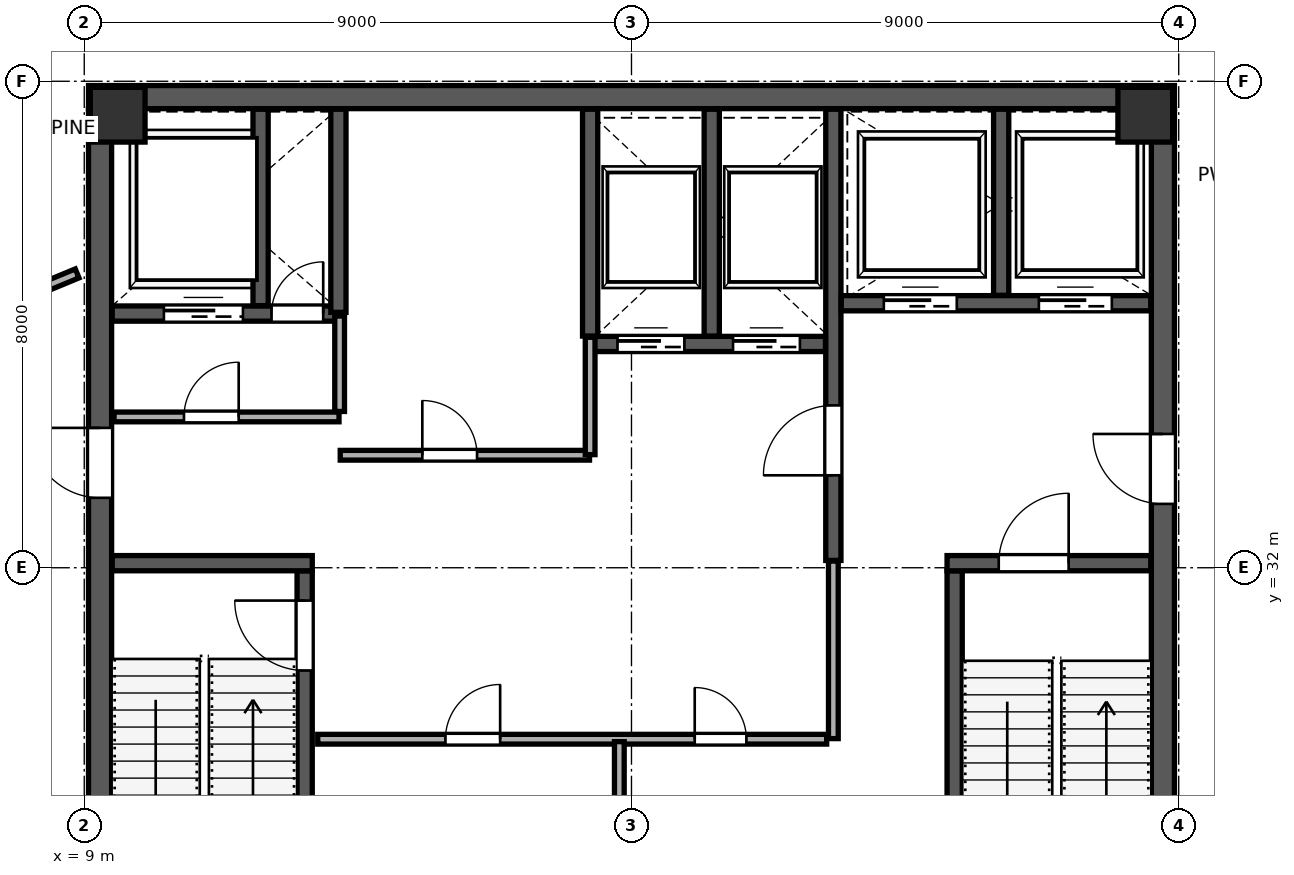
"""IFC4 building model, lengths in metres.
Left out: names, types, materials, properties, quantities, classifications, styles, units other than length and angle.
Written with IfcOpenShell. Run it as: python <this file> out.ifc"""

import sys

from ifc_helpers import new_model, si_unit, direction, frame, frame_2d, origin, origin_2d, place, context, subcontext, project, spatial, rectangle, extrude, source, transform, mapped, element, fill, save


model = new_model("IFC4")
c1 = context("Model", 3, precision=1e-05, world=origin(), true_north=direction((0.0, 1.0)))
c2 = subcontext(c1, "Body", "Model", "MODEL_VIEW")
j1 = project(units=[si_unit("LENGTHUNIT", "METRE"), si_unit("PLANEANGLEUNIT", "RADIAN")], contexts=[c1])
p1 = place(None, origin())
s1 = spatial("IfcSite", under=j1, at=p1, CompositionType="ELEMENT")
p2 = place(p1, origin())
s2 = spatial("IfcBuilding", under=s1, at=p2, CompositionType="ELEMENT")
p3 = place(p2, frame((0.0, 0.0, 360.0)))
s3 = spatial("IfcBuildingStorey", under=s2, at=p3, CompositionType="ELEMENT", Elevation=360.0)
m1 = source(origin(), c2, "Body", "SweptSolid", [
    extrude(rectangle(XDim=0.9, YDim=0.9, at=origin_2d()), origin(), (0.0, 0.0, 1.0), 5.999),
])
for number, where, z_axis, x_axis in (
    (1, (9.55, 39.45, 0.001), (0.0, 0.0, 1.0), (1.0, 0.0, 0.0)),
    (2, (26.45, 39.45, 0.001), (0.0, 0.0, 1.0), (1.0, 0.0, 0.0)),
):
    element("IfcColumn", number, at=place(p3, frame(where, z_axis=z_axis, x_axis=x_axis)), inside=s3, PredefinedType="COLUMN", context=c2, shape_type="MappedRepresentation", body=[
        mapped(m1, transform((0.0, 0.0, 0.0), scale=1.0)),
    ])
p4 = place(p3, frame((9.26, 24.45, 0.0), z_axis=(0.0, 0.0, 1.0), x_axis=(0.0, 1.0, 0.0)))
e3 = element("IfcWall", 3, at=p4, inside=s3, PredefinedType="SHEAR", context=c2, shape_type="SweptSolid", body=[
    extrude(rectangle(XDim=15.1, YDim=0.38, at=frame_2d((7.55, 0.0))), origin(), (0.0, 0.0, 1.0), 5.72),
])
p5 = place(p4, frame((8.7, 0.0, 0.0)))
e4 = element("IfcOpeningElement", 4, at=p5, cuts=e3, PredefinedType="OPENING", context=c2, shape_type="SweptSolid", body=[
    extrude(rectangle(XDim=1.15, YDim=2.2, at=frame_2d((0.575, 1.1))), frame((0.0, 0.2, 0.0), z_axis=(0.0, -1.0, 0.0), x_axis=(1.0, 0.0, 0.0)), (0.0, 0.0, 1.0), 0.4),
])
p6 = place(p3, frame((26.74, 24.45, 0.0), z_axis=(0.0, 0.0, 1.0), x_axis=(0.0, 1.0, 0.0)))
e5 = element("IfcWall", 5, at=p6, inside=s3, PredefinedType="SHEAR", context=c2, shape_type="SweptSolid", body=[
    extrude(rectangle(XDim=15.1, YDim=0.38, at=frame_2d((7.55, 0.0))), origin(), (0.0, 0.0, 1.0), 5.72),
])
p7 = place(p6, frame((8.6, 0.0, 0.0)))
e6 = element("IfcOpeningElement", 6, at=p7, cuts=e5, PredefinedType="OPENING", context=c2, shape_type="SweptSolid", body=[
    extrude(rectangle(XDim=1.15, YDim=2.2, at=frame_2d((0.575, 1.1))), frame((0.0, 0.2, 0.0), z_axis=(0.0, -1.0, 0.0), x_axis=(1.0, 0.0, 0.0)), (0.0, 0.0, 1.0), 0.4),
])
p8 = place(p3, frame((9.07, 39.74, 0.0), z_axis=(0.0, 0.0, 1.0), x_axis=(1.0, 0.0, 0.0)))
e7 = element("IfcWall", 7, at=p8, inside=s3, PredefinedType="SHEAR", context=c2, shape_type="SweptSolid", body=[
    extrude(rectangle(XDim=17.86, YDim=0.38, at=frame_2d((8.93, 0.0))), origin(), (0.0, 0.0, 1.0), 5.72),
])
p9 = place(p3, frame((12.625, 24.46, 0.0), z_axis=(0.0, 0.0, 1.0), x_axis=(0.0, 1.0, 0.0)))
e8 = element("IfcWall", 8, at=p9, inside=s3, PredefinedType="SHEAR", context=c2, shape_type="SweptSolid", body=[
    extrude(rectangle(XDim=7.49, YDim=0.25, at=frame_2d((3.745, 0.0))), origin(), (0.0, 0.0, 1.0), 5.72),
])
p10 = place(p9, frame((5.85, 0.0, 0.0)))
e9 = element("IfcOpeningElement", 9, at=p10, cuts=e8, PredefinedType="OPENING", context=c2, shape_type="SweptSolid", body=[
    extrude(rectangle(XDim=1.15, YDim=2.2, at=frame_2d((0.575, 1.1))), frame((0.0, 0.135, 0.0), z_axis=(0.0, -1.0, 0.0), x_axis=(1.0, 0.0, 0.0)), (0.0, 0.0, 1.0), 0.27),
])
p11 = place(p3, frame((9.46, 32.075, 0.0), z_axis=(0.0, 0.0, 1.0), x_axis=(1.0, 0.0, 0.0)))
e10 = element("IfcWall", 10, at=p11, inside=s3, PredefinedType="SHEAR", context=c2, shape_type="SweptSolid", body=[
    extrude(rectangle(XDim=3.29, YDim=0.25, at=frame_2d((1.645, 0.0))), origin(), (0.0, 0.0, 1.0), 5.72),
])
p12 = place(p3, frame((23.315, 24.46, 0.0), z_axis=(0.0, 0.0, 1.0), x_axis=(0.0, 1.0, 0.0)))
e11 = element("IfcWall", 11, at=p12, inside=s3, PredefinedType="SHEAR", context=c2, shape_type="SweptSolid", body=[
    extrude(rectangle(XDim=7.49, YDim=0.25, at=frame_2d((3.745, 0.0))), origin(), (0.0, 0.0, 1.0), 5.72),
])
p13 = place(p3, frame((23.19, 32.075, 0.0), z_axis=(0.0, 0.0, 1.0), x_axis=(1.0, 0.0, 0.0)))
e12 = element("IfcWall", 12, at=p13, inside=s3, PredefinedType="SHEAR", context=c2, shape_type="SweptSolid", body=[
    extrude(rectangle(XDim=3.35, YDim=0.25, at=frame_2d((1.675, 0.0))), origin(), (0.0, 0.0, 1.0), 5.72),
])
p14 = place(p13, frame((0.85, 0.0, 0.0)))
e13 = element("IfcOpeningElement", 13, at=p14, cuts=e12, PredefinedType="OPENING", context=c2, shape_type="SweptSolid", body=[
    extrude(rectangle(XDim=1.15, YDim=2.2, at=frame_2d((0.575, 1.1))), frame((0.0, 0.135, 0.0), z_axis=(0.0, -1.0, 0.0), x_axis=(1.0, 0.0, 0.0)), (0.0, 0.0, 1.0), 0.27),
])
p15 = place(p3, frame((21.32, 32.12, 0.0), z_axis=(0.0, 0.0, 1.0), x_axis=(0.0, 1.0, 0.0)))
e14 = element("IfcWall", 14, at=p15, inside=s3, PredefinedType="SHEAR", context=c2, shape_type="SweptSolid", body=[
    extrude(rectangle(XDim=7.42, YDim=0.25, at=frame_2d((3.71, 0.0))), origin(), (0.0, 0.0, 1.0), 5.72),
])
p16 = place(p15, frame((1.4, 0.0, 0.0)))
e15 = element("IfcOpeningElement", 15, at=p16, cuts=e14, PredefinedType="OPENING", context=c2, shape_type="SweptSolid", body=[
    extrude(rectangle(XDim=1.15, YDim=2.2, at=frame_2d((0.575, 1.1))), frame((0.0, 0.135, 0.0), z_axis=(0.0, -1.0, 0.0), x_axis=(1.0, 0.0, 0.0)), (0.0, 0.0, 1.0), 0.27),
])
p17 = place(p3, frame((9.46, 36.18, 0.0), z_axis=(0.0, 0.0, 1.0), x_axis=(1.0, 0.0, 0.0)))
e16 = element("IfcWall", 16, at=p17, inside=s3, PredefinedType="SHEAR", context=c2, shape_type="SweptSolid", body=[
    extrude(rectangle(XDim=3.79, YDim=0.25, at=frame_2d((1.895, 0.0))), origin(), (0.0, 0.0, 1.0), 5.72),
])
p18 = place(p17, frame((2.62, 0.0, 0.0)))
e17 = element("IfcOpeningElement", 17, at=p18, cuts=e16, PredefinedType="OPENING", context=c2, shape_type="SweptSolid", body=[
    extrude(rectangle(XDim=0.85, YDim=2.1, at=frame_2d((0.425, 1.05))), frame((0.0, 0.135, 0.0), z_axis=(0.0, -1.0, 0.0), x_axis=(1.0, 0.0, 0.0)), (0.0, 0.0, 1.0), 0.27),
])
p19 = place(p17, frame((0.85, 0.0, 0.0)))
e18 = element("IfcOpeningElement", 18, at=p19, cuts=e16, PredefinedType="OPENING", context=c2, shape_type="SweptSolid", body=[
    extrude(rectangle(XDim=1.3, YDim=2.25, at=frame_2d((0.65, 1.125))), frame((0.0, 0.135, 0.0), z_axis=(0.0, -1.0, 0.0), x_axis=(1.0, 0.0, 0.0)), (0.0, 0.0, 1.0), 0.27),
])
p20 = place(p3, frame((11.9, 36.31, 0.0), z_axis=(0.0, 0.0, 1.0), x_axis=(0.0, 1.0, 0.0)))
e19 = element("IfcWall", 19, at=p20, inside=s3, PredefinedType="SHEAR", context=c2, shape_type="SweptSolid", body=[
    extrude(rectangle(XDim=3.23, YDim=0.25, at=frame_2d((1.615, 0.0))), origin(), (0.0, 0.0, 1.0), 5.72),
])
p21 = place(p3, frame((21.45, 36.35, 0.0), z_axis=(0.0, 0.0, 1.0), x_axis=(1.0, 0.0, 0.0)))
e20 = element("IfcWall", 20, at=p21, inside=s3, PredefinedType="SHEAR", context=c2, shape_type="SweptSolid", body=[
    extrude(rectangle(XDim=5.09, YDim=0.25, at=frame_2d((2.545, 0.0))), origin(), (0.0, 0.0, 1.0), 5.72),
])
p22 = place(p21, frame((0.7, 0.0, 0.0)))
e21 = element("IfcOpeningElement", 21, at=p22, cuts=e20, PredefinedType="OPENING", context=c2, shape_type="SweptSolid", body=[
    extrude(rectangle(XDim=1.2, YDim=2.2, at=frame_2d((0.6, 1.1))), frame((0.0, 0.135, 0.0), z_axis=(0.0, -1.0, 0.0), x_axis=(1.0, 0.0, 0.0)), (0.0, 0.0, 1.0), 0.27),
])
p23 = place(p21, frame((3.25, 0.0, 0.0)))
e22 = element("IfcOpeningElement", 22, at=p23, cuts=e20, PredefinedType="OPENING", context=c2, shape_type="SweptSolid", body=[
    extrude(rectangle(XDim=1.2, YDim=2.2, at=frame_2d((0.6, 1.1))), frame((0.0, 0.135, 0.0), z_axis=(0.0, -1.0, 0.0), x_axis=(1.0, 0.0, 0.0)), (0.0, 0.0, 1.0), 0.27),
])
p24 = place(p3, frame((24.08, 36.48, 0.0), z_axis=(0.0, 0.0, 1.0), x_axis=(0.0, 1.0, 0.0)))
e23 = element("IfcWall", 23, at=p24, inside=s3, PredefinedType="SHEAR", context=c2, shape_type="SweptSolid", body=[
    extrude(rectangle(XDim=3.06, YDim=0.25, at=frame_2d((1.53, 0.0))), origin(), (0.0, 0.0, 1.0), 5.72),
])
p25 = place(p3, frame((13.18, 36.2, 0.0), z_axis=(0.0, 0.0, 1.0), x_axis=(0.0, 1.0, 0.0)))
e24 = element("IfcWall", 24, at=p25, inside=s3, PredefinedType="SHEAR", context=c2, shape_type="SweptSolid", body=[
    extrude(rectangle(XDim=3.34, YDim=0.25, at=frame_2d((1.67, 0.0))), origin(), (0.0, 0.0, 1.0), 5.72),
])
p26 = place(p3, frame((17.32, 35.68, 0.0), z_axis=(0.0, 0.0, 1.0), x_axis=(1.0, 0.0, 0.0)))
e25 = element("IfcWall", 25, at=p26, inside=s3, PredefinedType="SHEAR", context=c2, shape_type="SweptSolid", body=[
    extrude(rectangle(XDim=3.87, YDim=0.25, at=frame_2d((1.935, 0.0))), origin(), (0.0, 0.0, 1.0), 5.72),
])
p27 = place(p26, frame((0.45, 0.0, 0.0)))
e26 = element("IfcOpeningElement", 26, at=p27, cuts=e25, PredefinedType="OPENING", context=c2, shape_type="SweptSolid", body=[
    extrude(rectangle(XDim=1.1, YDim=2.2, at=frame_2d((0.55, 1.1))), frame((0.0, 0.135, 0.0), z_axis=(0.0, -1.0, 0.0), x_axis=(1.0, 0.0, 0.0)), (0.0, 0.0, 1.0), 0.27),
])
p28 = place(p26, frame((2.35, 0.0, 0.0)))
e27 = element("IfcOpeningElement", 27, at=p28, cuts=e25, PredefinedType="OPENING", context=c2, shape_type="SweptSolid", body=[
    extrude(rectangle(XDim=1.1, YDim=2.2, at=frame_2d((0.55, 1.1))), frame((0.0, 0.135, 0.0), z_axis=(0.0, -1.0, 0.0), x_axis=(1.0, 0.0, 0.0)), (0.0, 0.0, 1.0), 0.27),
])
for number, where, z_axis, x_axis in (
    (28, (17.32, 35.81, 0.0), (0.0, 0.0, 1.0), (0.0, 1.0, 0.0)),
    (29, (19.32, 35.81, 0.0), (0.0, 0.0, 1.0), (0.0, 1.0, 0.0)),
):
    element("IfcWall", number, at=place(p3, frame(where, z_axis=z_axis, x_axis=x_axis)), inside=s3, PredefinedType="SHEAR", context=c2, shape_type="SweptSolid", body=[
        extrude(rectangle(XDim=3.73, YDim=0.25, at=frame_2d((1.865, 0.0))), origin(), (0.0, 0.0, 1.0), 5.72),
    ])
p29 = place(p3, frame((9.49, 34.48, 0.0), z_axis=(0.0, 0.0, 1.0), x_axis=(1.0, 0.0, 0.0)))
e30 = element("IfcWall", 30, at=p29, inside=s3, PredefinedType="PARTITIONING", context=c2, shape_type="SweptSolid", body=[
    extrude(rectangle(XDim=3.7, YDim=0.16, at=frame_2d((1.85, 0.0))), origin(), (0.0, 0.0, 1.0), 5.72),
])
p30 = place(p29, frame((1.15, 0.0, 0.0)))
e31 = element("IfcOpeningElement", 31, at=p30, cuts=e30, PredefinedType="OPENING", context=c2, shape_type="SweptSolid", body=[
    extrude(rectangle(XDim=0.9, YDim=2.15, at=frame_2d((0.45, 1.075))), frame((0.0, 0.09, 0.0), z_axis=(0.0, -1.0, 0.0), x_axis=(1.0, 0.0, 0.0)), (0.0, 0.0, 1.0), 0.18),
])
p31 = place(p3, frame((13.2, 34.57, 0.0), z_axis=(0.0, 0.0, 1.0), x_axis=(0.0, 1.0, 0.0)))
e32 = element("IfcWall", 32, at=p31, inside=s3, PredefinedType="PARTITIONING", context=c2, shape_type="SweptSolid", body=[
    extrude(rectangle(XDim=1.57, YDim=0.16, at=frame_2d((0.785, 0.0))), origin(), (0.0, 0.0, 1.0), 5.72),
])
p32 = place(p3, frame((13.21, 33.85, 0.0), z_axis=(0.0, 0.0, 1.0), x_axis=(1.0, 0.0, 0.0)))
e33 = element("IfcWall", 33, at=p32, inside=s3, PredefinedType="PARTITIONING", context=c2, shape_type="SweptSolid", body=[
    extrude(rectangle(XDim=4.1, YDim=0.16, at=frame_2d((2.05, 0.0))), origin(), (0.0, 0.0, 1.0), 5.72),
])
p33 = place(p32, frame((1.35, 0.0, 0.0)))
e34 = element("IfcOpeningElement", 34, at=p33, cuts=e33, PredefinedType="OPENING", context=c2, shape_type="SweptSolid", body=[
    extrude(rectangle(XDim=0.9, YDim=2.15, at=frame_2d((0.45, 1.075))), frame((0.0, 0.09, 0.0), z_axis=(0.0, -1.0, 0.0), x_axis=(1.0, 0.0, 0.0)), (0.0, 0.0, 1.0), 0.18),
])
p34 = place(p3, frame((17.32, 33.86, 0.0), z_axis=(0.0, 0.0, 1.0), x_axis=(0.0, 1.0, 0.0)))
e35 = element("IfcWall", 35, at=p34, inside=s3, PredefinedType="PARTITIONING", context=c2, shape_type="SweptSolid", body=[
    extrude(rectangle(XDim=1.93, YDim=0.16, at=frame_2d((0.965, 0.0))), origin(), (0.0, 0.0, 1.0), 5.72),
])
p35 = place(p3, frame((12.84, 29.18, 0.0), z_axis=(0.0, 0.0, 1.0), x_axis=(1.0, 0.0, 0.0)))
e36 = element("IfcWall", 36, at=p35, inside=s3, PredefinedType="PARTITIONING", context=c2, shape_type="SweptSolid", body=[
    extrude(rectangle(XDim=8.37, YDim=0.16, at=frame_2d((4.185, 0.0))), origin(), (0.0, 0.0, 1.0), 5.72),
])
p36 = place(p35, frame((2.1, 0.0, 0.0)))
e37 = element("IfcOpeningElement", 37, at=p36, cuts=e36, PredefinedType="OPENING", context=c2, shape_type="SweptSolid", body=[
    extrude(rectangle(XDim=0.9, YDim=2.15, at=frame_2d((0.45, 1.075))), frame((0.0, 0.09, 0.0), z_axis=(0.0, -1.0, 0.0), x_axis=(1.0, 0.0, 0.0)), (0.0, 0.0, 1.0), 0.18),
])
p37 = place(p35, frame((6.2, 0.0, 0.0)))
e38 = element("IfcOpeningElement", 38, at=p37, cuts=e36, PredefinedType="OPENING", context=c2, shape_type="SweptSolid", body=[
    extrude(rectangle(XDim=0.85, YDim=2.1, at=frame_2d((0.425, 1.05))), frame((0.0, 0.09, 0.0), z_axis=(0.0, -1.0, 0.0), x_axis=(1.0, 0.0, 0.0)), (0.0, 0.0, 1.0), 0.18),
])
p38 = place(p3, frame((17.8, 24.54, 0.0), z_axis=(0.0, 0.0, 1.0), x_axis=(0.0, 1.0, 0.0)))
e39 = element("IfcWall", 39, at=p38, inside=s3, PredefinedType="PARTITIONING", context=c2, shape_type="SweptSolid", body=[
    extrude(rectangle(XDim=4.6, YDim=0.16, at=frame_2d((2.3, 0.0))), origin(), (0.0, 0.0, 1.0), 5.72),
])
p39 = place(p3, frame((21.32, 29.19, 0.0), z_axis=(0.0, 0.0, 1.0), x_axis=(0.0, 1.0, 0.0)))
e40 = element("IfcWall", 40, at=p39, inside=s3, PredefinedType="PARTITIONING", context=c2, shape_type="SweptSolid", body=[
    extrude(rectangle(XDim=2.92, YDim=0.16, at=frame_2d((1.46, 0.0))), origin(), (0.0, 0.0, 1.0), 5.72),
])
p40 = place(p3, frame((4.194, 34.898, 0.0), z_axis=(0.0, 0.0, 1.0), x_axis=(0.923876129391, 0.38269164812, 0.0)))
e41 = element("IfcWall", 41, at=p40, inside=s3, PredefinedType="PARTITIONING", context=c2, shape_type="SweptSolid", body=[
    extrude(rectangle(XDim=5.076, YDim=0.16, at=frame_2d((2.538, 0.0))), origin(), (0.0, 0.0, 1.0), 5.72),
])
p41 = place(p3, frame((25.996, 48.269, 0.0), z_axis=(0.0, 0.0, 1.0), x_axis=(0.382683927115, -0.923879327579, 0.0)))
e42 = element("IfcWall", 42, at=p41, inside=s3, PredefinedType="PARTITIONING", context=c2, shape_type="SweptSolid", body=[
    extrude(rectangle(XDim=10.82, YDim=0.115, at=frame_2d((5.41, 0.0))), origin(), (0.0, 0.0, 1.0), 5.72),
])
p42 = place(p41, frame((3.1, 0.0, 0.0)))
e43 = element("IfcOpeningElement", 43, at=p42, cuts=e42, PredefinedType="OPENING", context=c2, shape_type="SweptSolid", body=[
    extrude(rectangle(XDim=0.95, YDim=2.15, at=frame_2d((0.475, 1.075))), frame((0.0, 0.067, 0.0), z_axis=(0.0, -1.0, 0.0), x_axis=(1.0, 0.0, 0.0)), (0.0, 0.0, 1.0), 0.135),
])
p43 = place(p3, frame((4.03, 39.213, 0.0), z_axis=(0.0, 0.0, 1.0), x_axis=(0.923873590168, 0.382697778135, 0.0)))
e44 = element("IfcWall", 44, at=p43, inside=s3, PredefinedType="PARTITIONING", context=c2, shape_type="SweptSolid", body=[
    extrude(rectangle(XDim=6.087, YDim=0.135, at=frame_2d((3.043, 0.0))), origin(), (0.0, 0.0, 1.0), 5.72),
])
p44 = place(p3, frame((23.567, 22.411, 0.0), z_axis=(0.0, 0.0, 1.0), x_axis=(0.923875223291, 0.382693835577, 0.0)))
e45 = element("IfcWall", 45, at=p44, inside=s3, PredefinedType="PARTITIONING", context=c2, shape_type="SweptSolid", body=[
    extrude(rectangle(XDim=17.672, YDim=0.16, at=frame_2d((8.836, 0.0))), origin(), (0.0, 0.0, 1.0), 5.72),
])
m2 = source(origin(), c2, "Body", "SweptSolid", [
    extrude(rectangle(XDim=1.15, YDim=2.2, at=frame_2d((0.575, 1.1))), frame((0.0, 0.025, 0.0), z_axis=(0.0, -1.0, 0.0), x_axis=(1.0, 0.0, 0.0)), (0.0, 0.0, 1.0), 0.05),
])
p45 = place(p10, origin())
e46 = element("IfcDoor", 46, at=p45, inside=s3, OperationType="SINGLE_SWING_RIGHT", PredefinedType="DOOR", context=c2, shape_type="MappedRepresentation", body=[
    mapped(m2, transform((0.0, 0.0, 0.0), scale=1.0)),
])
fill(e9, e46)
m3 = source(origin(), c2, "Body", "SweptSolid", [
    extrude(rectangle(XDim=1.15, YDim=2.2, at=frame_2d((0.575, 1.1))), frame((0.0, 0.025, 0.0), z_axis=(0.0, -1.0, 0.0), x_axis=(1.0, 0.0, 0.0)), (0.0, 0.0, 1.0), 0.05),
])
p46 = place(p16, origin())
e47 = element("IfcDoor", 47, at=p46, inside=s3, OperationType="SINGLE_SWING_LEFT", PredefinedType="DOOR", context=c2, shape_type="MappedRepresentation", body=[
    mapped(m3, transform((0.0, 0.0, 0.0), scale=1.0)),
])
fill(e15, e47)
p47 = place(p14, origin())
e48 = element("IfcDoor", 48, at=p47, inside=s3, OperationType="SINGLE_SWING_RIGHT", PredefinedType="DOOR", context=c2, shape_type="MappedRepresentation", body=[
    mapped(m2, transform((0.0, 0.0, 0.0), scale=1.0)),
])
fill(e13, e48)
p48 = place(p7, origin())
e49 = element("IfcDoor", 49, at=p48, inside=s3, OperationType="SINGLE_SWING_RIGHT", PredefinedType="DOOR", context=c2, shape_type="MappedRepresentation", body=[
    mapped(m3, transform((0.0, 0.0, 0.0), scale=1.0)),
])
fill(e6, e49)
p49 = place(p5, origin())
e50 = element("IfcDoor", 50, at=p49, inside=s3, OperationType="SINGLE_SWING_RIGHT", PredefinedType="DOOR", context=c2, shape_type="MappedRepresentation", body=[
    mapped(m3, transform((0.0, 0.0, 0.0), scale=1.0)),
])
fill(e4, e50)
m4 = source(origin(), c2, "Body", "SweptSolid", [
    extrude(rectangle(XDim=0.85, YDim=2.1, at=frame_2d((0.425, 1.05))), frame((0.0, 0.025, 0.0), z_axis=(0.0, -1.0, 0.0), x_axis=(1.0, 0.0, 0.0)), (0.0, 0.0, 1.0), 0.05),
])
p50 = place(p18, origin())
e51 = element("IfcDoor", 51, at=p50, inside=s3, OperationType="SINGLE_SWING_RIGHT", PredefinedType="DOOR", context=c2, shape_type="MappedRepresentation", body=[
    mapped(m4, transform((0.0, 0.0, 0.0), scale=1.0)),
])
fill(e17, e51)
m5 = source(origin(), c2, "Body", "SweptSolid", [
    extrude(rectangle(XDim=1.1, YDim=2.2, at=frame_2d((0.55, 1.1))), frame((0.0, 0.025, 0.0), z_axis=(0.0, -1.0, 0.0), x_axis=(1.0, 0.0, 0.0)), (0.0, 0.0, 1.0), 0.05),
])
p51 = place(p27, origin())
e52 = element("IfcDoor", 52, at=p51, inside=s3, OperationType="SLIDING_TO_LEFT", PredefinedType="DOOR", context=c2, shape_type="MappedRepresentation", body=[
    mapped(m5, transform((0.0, 0.0, 0.0), scale=1.0)),
])
fill(e26, e52)
p52 = place(p28, origin())
e53 = element("IfcDoor", 53, at=p52, inside=s3, OperationType="SLIDING_TO_RIGHT", PredefinedType="DOOR", context=c2, shape_type="MappedRepresentation", body=[
    mapped(m5, transform((0.0, 0.0, 0.0), scale=1.0)),
])
fill(e27, e53)
m6 = source(origin(), c2, "Body", "SweptSolid", [
    extrude(rectangle(XDim=1.2, YDim=2.2, at=frame_2d((0.6, 1.1))), frame((0.0, 0.025, 0.0), z_axis=(0.0, -1.0, 0.0), x_axis=(1.0, 0.0, 0.0)), (0.0, 0.0, 1.0), 0.05),
])
p53 = place(p22, origin())
e54 = element("IfcDoor", 54, at=p53, inside=s3, OperationType="SLIDING_TO_LEFT", PredefinedType="DOOR", context=c2, shape_type="MappedRepresentation", body=[
    mapped(m6, transform((0.0, 0.0, 0.0), scale=1.0)),
])
fill(e21, e54)
p54 = place(p23, origin())
e55 = element("IfcDoor", 55, at=p54, inside=s3, OperationType="SLIDING_TO_RIGHT", PredefinedType="DOOR", context=c2, shape_type="MappedRepresentation", body=[
    mapped(m6, transform((0.0, 0.0, 0.0), scale=1.0)),
])
fill(e22, e55)
m7 = source(origin(), c2, "Body", "SweptSolid", [
    extrude(rectangle(XDim=1.3, YDim=2.25, at=frame_2d((0.65, 1.125))), frame((0.0, 0.025, 0.0), z_axis=(0.0, -1.0, 0.0), x_axis=(1.0, 0.0, 0.0)), (0.0, 0.0, 1.0), 0.05),
])
p55 = place(p19, origin())
e56 = element("IfcDoor", 56, at=p55, inside=s3, OperationType="SLIDING_TO_LEFT", PredefinedType="DOOR", context=c2, shape_type="MappedRepresentation", body=[
    mapped(m7, transform((0.0, 0.0, 0.0), scale=1.0)),
])
fill(e18, e56)
m8 = source(origin(), c2, "Body", "SweptSolid", [
    extrude(rectangle(XDim=0.9, YDim=2.15, at=frame_2d((0.45, 1.075))), frame((0.0, 0.025, 0.0), z_axis=(0.0, -1.0, 0.0), x_axis=(1.0, 0.0, 0.0)), (0.0, 0.0, 1.0), 0.05),
])
p56 = place(p30, origin())
e57 = element("IfcDoor", 57, at=p56, inside=s3, OperationType="SINGLE_SWING_RIGHT", PredefinedType="DOOR", context=c2, shape_type="MappedRepresentation", body=[
    mapped(m8, transform((0.0, 0.0, 0.0), scale=1.0)),
])
fill(e31, e57)
p57 = place(p33, origin())
e58 = element("IfcDoor", 58, at=p57, inside=s3, OperationType="SINGLE_SWING_LEFT", PredefinedType="DOOR", context=c2, shape_type="MappedRepresentation", body=[
    mapped(m8, transform((0.0, 0.0, 0.0), scale=1.0)),
])
fill(e34, e58)
p58 = place(p36, origin())
e59 = element("IfcDoor", 59, at=p58, inside=s3, OperationType="SINGLE_SWING_RIGHT", PredefinedType="DOOR", context=c2, shape_type="MappedRepresentation", body=[
    mapped(m8, transform((0.0, 0.0, 0.0), scale=1.0)),
])
fill(e37, e59)
p59 = place(p37, origin())
e60 = element("IfcDoor", 60, at=p59, inside=s3, OperationType="SINGLE_SWING_LEFT", PredefinedType="DOOR", context=c2, shape_type="MappedRepresentation", body=[
    mapped(m4, transform((0.0, 0.0, 0.0), scale=1.0)),
])
fill(e38, e60)
save(model, sys.argv[1])
